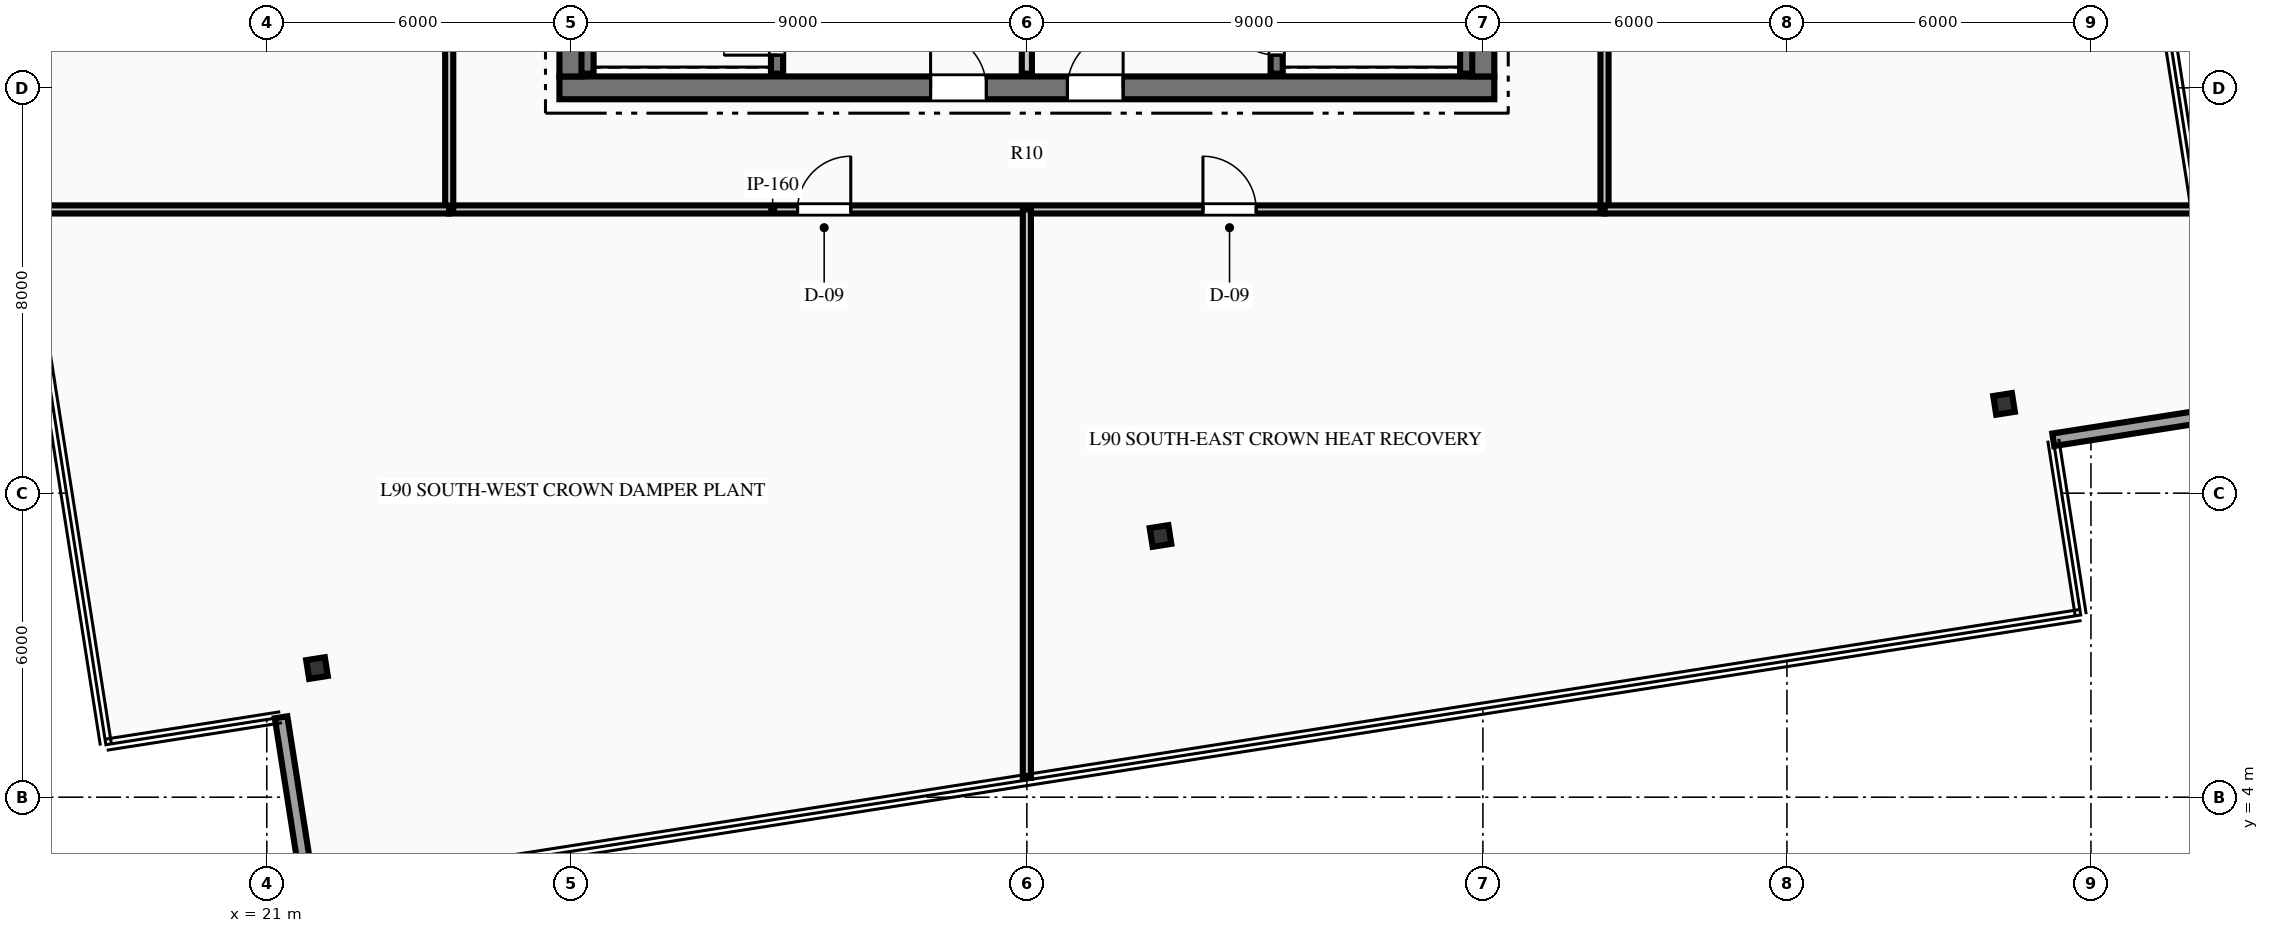
"""IFC4 building model, lengths in metres.
Left out: names, types, materials, properties, quantities, classifications, styles, units other than length and angle.
Written with IfcOpenShell. Run it as: python <this file> out.ifc"""

import sys

from ifc_helpers import new_model, si_unit, direction, frame, frame_2d, origin, origin_2d, place, context, subcontext, project, spatial, rectangle, i_section, extrude, element, fill, save


model = new_model("IFC4")
c1 = context("Model", 3, precision=1e-05, world=origin(), true_north=direction((0.0, 1.0)))
c2 = subcontext(c1, "Body", "Model", "MODEL_VIEW")
j1 = project(units=[si_unit("LENGTHUNIT", "METRE"), si_unit("PLANEANGLEUNIT", "RADIAN")], contexts=[c1])
p1 = place(None, origin())
s1 = spatial("IfcSite", under=j1, at=p1, CompositionType="ELEMENT")
p2 = place(p1, origin())
s2 = spatial("IfcBuilding", under=s1, at=p2, CompositionType="ELEMENT")
p3 = place(p2, frame((0.0, 0.0, 356.4)))
s3 = spatial("IfcBuildingStorey", under=s2, at=p3, CompositionType="ELEMENT", Elevation=356.4)
p4 = place(p3, frame((26.775, 18.0, 0.0), z_axis=(0.0, 0.0, 1.0), x_axis=(1.0, 0.0, 0.0)))
e1 = element("IfcWall", 1, at=p4, inside=s3, PredefinedType="SHEAR", context=c2, shape_type="SweptSolid", body=[
    extrude(rectangle(XDim=18.45, YDim=0.45, at=frame_2d((9.225, 0.0))), origin(), (0.0, 0.0, 1.0), 4.2),
])
p5 = place(p4, frame((7.325, 0.0, 0.0)))
e2 = element("IfcOpeningElement", 2, at=p5, cuts=e1, PredefinedType="OPENING", context=c2, shape_type="SweptSolid", body=[
    extrude(rectangle(XDim=1.1, YDim=2.15, at=frame_2d((0.55, 1.075))), frame((0.0, 0.235, 0.0), z_axis=(0.0, -1.0, 0.0), x_axis=(1.0, 0.0, 0.0)), (0.0, 0.0, 1.0), 0.47),
])
p6 = place(p4, frame((10.025, 0.0, 0.0)))
e3 = element("IfcOpeningElement", 3, at=p6, cuts=e1, PredefinedType="OPENING", context=c2, shape_type="SweptSolid", body=[
    extrude(rectangle(XDim=1.1, YDim=2.15, at=frame_2d((0.55, 1.075))), frame((0.0, 0.235, 0.0), z_axis=(0.0, -1.0, 0.0), x_axis=(1.0, 0.0, 0.0)), (0.0, 0.0, 1.0), 0.47),
])
p7 = place(p3, frame((27.0, 18.225, 0.0), z_axis=(0.0, 0.0, 1.0), x_axis=(0.0, 1.0, 0.0)))
e4 = element("IfcWall", 4, at=p7, inside=s3, PredefinedType="SHEAR", context=c2, shape_type="SweptSolid", body=[
    extrude(rectangle(XDim=15.55, YDim=0.45, at=frame_2d((7.775, 0.0))), origin(), (0.0, 0.0, 1.0), 4.2),
])
p8 = place(p7, frame((10.015, 0.0, 0.0)))
e5 = element("IfcOpeningElement", 5, at=p8, cuts=e4, PredefinedType="OPENING", context=c2, shape_type="SweptSolid", body=[
    extrude(rectangle(XDim=1.4, YDim=2.2, at=frame_2d((0.7, 1.1))), frame((0.0, 0.235, 0.0), z_axis=(0.0, -1.0, 0.0), x_axis=(1.0, 0.0, 0.0)), (0.0, 0.0, 1.0), 0.47),
])
p9 = place(p3, frame((45.0, 18.225, 0.0), z_axis=(0.0, 0.0, 1.0), x_axis=(0.0, 1.0, 0.0)))
e6 = element("IfcWall", 6, at=p9, inside=s3, PredefinedType="SHEAR", context=c2, shape_type="SweptSolid", body=[
    extrude(rectangle(XDim=15.55, YDim=0.45, at=frame_2d((7.775, 0.0))), origin(), (0.0, 0.0, 1.0), 4.2),
])
p10 = place(p9, frame((10.015, 0.0, 0.0)))
e7 = element("IfcOpeningElement", 7, at=p10, cuts=e6, PredefinedType="OPENING", context=c2, shape_type="SweptSolid", body=[
    extrude(rectangle(XDim=1.4, YDim=2.2, at=frame_2d((0.7, 1.1))), frame((0.0, 0.235, 0.0), z_axis=(0.0, -1.0, 0.0), x_axis=(1.0, 0.0, 0.0)), (0.0, 0.0, 1.0), 0.47),
])
p11 = place(p3, frame((31.07, 18.28, 0.0), z_axis=(0.0, 0.0, 1.0), x_axis=(0.0, 1.0, 0.0)))
e8 = element("IfcWall", 8, at=p11, inside=s3, PredefinedType="SHEAR", context=c2, shape_type="SweptSolid", body=[
    extrude(rectangle(XDim=8.26, YDim=0.24, at=frame_2d((4.13, 0.0))), origin(), (0.0, 0.0, 1.0), 4.2),
])
p12 = place(p11, frame((0.365, 0.0, 0.0)))
e9 = element("IfcOpeningElement", 9, at=p12, cuts=e8, PredefinedType="OPENING", context=c2, shape_type="SweptSolid", body=[
    extrude(rectangle(XDim=1.05, YDim=2.15, at=frame_2d((0.525, 1.075))), frame((0.0, 0.13, 0.0), z_axis=(0.0, -1.0, 0.0), x_axis=(1.0, 0.0, 0.0)), (0.0, 0.0, 1.0), 0.26),
])
p13 = place(p3, frame((27.33, 18.28, 0.0), z_axis=(0.0, 0.0, 1.0), x_axis=(0.0, 1.0, 0.0)))
e10 = element("IfcWall", 10, at=p13, inside=s3, PredefinedType="SHEAR", context=c2, shape_type="SweptSolid", body=[
    extrude(rectangle(XDim=8.26, YDim=0.24, at=frame_2d((4.13, 0.0))), origin(), (0.0, 0.0, 1.0), 4.2),
])
p14 = place(p3, frame((40.93, 18.28, 0.0), z_axis=(0.0, 0.0, 1.0), x_axis=(0.0, 1.0, 0.0)))
e11 = element("IfcWall", 11, at=p14, inside=s3, PredefinedType="SHEAR", context=c2, shape_type="SweptSolid", body=[
    extrude(rectangle(XDim=8.26, YDim=0.24, at=frame_2d((4.13, 0.0))), origin(), (0.0, 0.0, 1.0), 4.2),
])
p15 = place(p14, frame((0.365, 0.0, 0.0)))
e12 = element("IfcOpeningElement", 12, at=p15, cuts=e11, PredefinedType="OPENING", context=c2, shape_type="SweptSolid", body=[
    extrude(rectangle(XDim=1.05, YDim=2.15, at=frame_2d((0.525, 1.075))), frame((0.0, 0.13, 0.0), z_axis=(0.0, -1.0, 0.0), x_axis=(1.0, 0.0, 0.0)), (0.0, 0.0, 1.0), 0.26),
])
p16 = place(p3, frame((44.67, 18.28, 0.0), z_axis=(0.0, 0.0, 1.0), x_axis=(0.0, 1.0, 0.0)))
e13 = element("IfcWall", 13, at=p16, inside=s3, PredefinedType="SHEAR", context=c2, shape_type="SweptSolid", body=[
    extrude(rectangle(XDim=8.26, YDim=0.24, at=frame_2d((4.13, 0.0))), origin(), (0.0, 0.0, 1.0), 4.2),
])
for number, where, z_axis, x_axis in (
    (14, (55.285, 11.762, 0.0), (0.0, 0.0, 1.0), (-0.155, 0.988, 0.0)),
    (15, (21.991, 6.548, 0.0), (0.0, 0.0, 1.0), (-0.155, 0.988, 0.0)),
    (16, (38.638, 9.155, 0.0), (0.0, 0.0, 1.0), (-0.155, 0.988, 0.0)),
):
    element("IfcColumn", number, at=place(p3, frame(where, z_axis=z_axis, x_axis=x_axis)), inside=s3, PredefinedType="COLUMN", context=c2, shape_type="SweptSolid", body=[
        extrude(i_section(OverallWidth=0.374, OverallDepth=0.373, WebThickness=0.016, FlangeThickness=0.026, at=origin_2d()), origin(), (0.0, 0.0, 1.0), 4.2),
    ])
p17 = place(p3, frame((21.824, 2.119, 0.0), z_axis=(0.0, 0.0, 1.0), x_axis=(-0.154719468176, 0.987958443543, 0.0)))
e17 = element("IfcWall", 17, at=p17, inside=s3, PredefinedType="STANDARD", context=c2, shape_type="SweptSolid", body=[
    extrude(rectangle(XDim=3.5, YDim=0.25, at=frame_2d((1.75, 0.0))), origin(), (0.0, 0.0, 1.0), 3.93),
])
p18 = place(p3, frame((59.714, 11.595, 0.0), z_axis=(0.0, 0.0, 1.0), x_axis=(-0.987960113204, -0.154708806205, 0.0)))
e18 = element("IfcWall", 18, at=p18, inside=s3, PredefinedType="STANDARD", context=c2, shape_type="SweptSolid", body=[
    extrude(rectangle(XDim=3.5, YDim=0.25, at=frame_2d((1.75, 0.0))), origin(), (0.0, 0.0, 1.0), 3.93),
])
p19 = place(p3, frame((36.0, 18.28, 0.0), z_axis=(0.0, 0.0, 1.0), x_axis=(0.0, 1.0, 0.0)))
e19 = element("IfcWall", 19, at=p19, inside=s3, PredefinedType="PARTITIONING", context=c2, shape_type="SweptSolid", body=[
    extrude(rectangle(XDim=3.77, YDim=0.2, at=frame_2d((1.885, 0.0))), origin(), (0.0, 0.0, 1.0), 3.93),
])
p20 = place(p3, frame((24.6, 15.6, 0.0), z_axis=(0.0, 0.0, 1.0), x_axis=(1.0, 0.0, 0.0)))
e20 = element("IfcWall", 20, at=p20, inside=s3, PredefinedType="PARTITIONING", context=c2, shape_type="SweptSolid", body=[
    extrude(rectangle(XDim=22.8, YDim=0.16, at=frame_2d((11.4, 0.0))), origin(), (0.0, 0.0, 1.0), 3.93),
])
p21 = place(p20, frame((6.875, 0.0, 0.0)))
e21 = element("IfcOpeningElement", 21, at=p21, cuts=e20, PredefinedType="OPENING", context=c2, shape_type="SweptSolid", body=[
    extrude(rectangle(XDim=1.05, YDim=2.15, at=frame_2d((0.525, 1.075))), frame((0.0, 0.09, 0.0), z_axis=(0.0, -1.0, 0.0), x_axis=(1.0, 0.0, 0.0)), (0.0, 0.0, 1.0), 0.18),
])
p22 = place(p20, frame((14.875, 0.0, 0.0)))
e22 = element("IfcOpeningElement", 22, at=p22, cuts=e20, PredefinedType="OPENING", context=c2, shape_type="SweptSolid", body=[
    extrude(rectangle(XDim=1.05, YDim=2.15, at=frame_2d((0.525, 1.075))), frame((0.0, 0.09, 0.0), z_axis=(0.0, -1.0, 0.0), x_axis=(1.0, 0.0, 0.0)), (0.0, 0.0, 1.0), 0.18),
])
p23 = place(p3, frame((24.6, 15.6, 0.0), z_axis=(0.0, 0.0, 1.0), x_axis=(0.0, 1.0, 0.0)))
e23 = element("IfcWall", 23, at=p23, inside=s3, PredefinedType="PARTITIONING", context=c2, shape_type="SweptSolid", body=[
    extrude(rectangle(XDim=20.8, YDim=0.16, at=frame_2d((10.4, 0.0))), origin(), (0.0, 0.0, 1.0), 3.93),
])
p24 = place(p23, frame((7.375, 0.0, 0.0)))
e24 = element("IfcOpeningElement", 24, at=p24, cuts=e23, PredefinedType="OPENING", context=c2, shape_type="SweptSolid", body=[
    extrude(rectangle(XDim=1.05, YDim=2.15, at=frame_2d((0.525, 1.075))), frame((0.0, 0.09, 0.0), z_axis=(0.0, -1.0, 0.0), x_axis=(1.0, 0.0, 0.0)), (0.0, 0.0, 1.0), 0.18),
])
p25 = place(p3, frame((47.4, 15.6, 0.0), z_axis=(0.0, 0.0, 1.0), x_axis=(0.0, 1.0, 0.0)))
e25 = element("IfcWall", 25, at=p25, inside=s3, PredefinedType="PARTITIONING", context=c2, shape_type="SweptSolid", body=[
    extrude(rectangle(XDim=20.8, YDim=0.16, at=frame_2d((10.4, 0.0))), origin(), (0.0, 0.0, 1.0), 3.93),
])
p26 = place(p25, frame((7.375, 0.0, 0.0)))
e26 = element("IfcOpeningElement", 26, at=p26, cuts=e25, PredefinedType="OPENING", context=c2, shape_type="SweptSolid", body=[
    extrude(rectangle(XDim=1.05, YDim=2.15, at=frame_2d((0.525, 1.075))), frame((0.0, 0.09, 0.0), z_axis=(0.0, -1.0, 0.0), x_axis=(1.0, 0.0, 0.0)), (0.0, 0.0, 1.0), 0.18),
])
p27 = place(p3, frame((36.0, 4.38, 0.0), z_axis=(0.0, 0.0, 1.0), x_axis=(0.0, 1.0, 0.0)))
e27 = element("IfcWall", 27, at=p27, inside=s3, PredefinedType="PARTITIONING", context=c2, shape_type="SweptSolid", body=[
    extrude(rectangle(XDim=11.22, YDim=0.16, at=frame_2d((5.61, 0.0))), origin(), (0.0, 0.0, 1.0), 3.93),
])
p28 = place(p3, frame((16.211, 15.6, 0.0), z_axis=(0.0, 0.0, 1.0), x_axis=(1.0, 0.0, 0.0)))
e28 = element("IfcWall", 28, at=p28, inside=s3, PredefinedType="PARTITIONING", context=c2, shape_type="SweptSolid", body=[
    extrude(rectangle(XDim=8.389, YDim=0.16, at=frame_2d((4.195, 0.0))), origin(), (0.0, 0.0, 1.0), 3.93),
])
p29 = place(p3, frame((47.4, 15.6, 0.0), z_axis=(0.0, 0.0, 1.0), x_axis=(1.0, 0.0, 0.0)))
e29 = element("IfcWall", 29, at=p29, inside=s3, PredefinedType="PARTITIONING", context=c2, shape_type="SweptSolid", body=[
    extrude(rectangle(XDim=11.646, YDim=0.16, at=frame_2d((5.823, 0.0))), origin(), (0.0, 0.0, 1.0), 3.93),
])
p30 = place(p12, origin())
e30 = element("IfcDoor", 30, at=p30, inside=s3, OperationType="SINGLE_SWING_LEFT", PredefinedType="DOOR", context=c2, shape_type="SweptSolid", body=[
    extrude(rectangle(XDim=1.05, YDim=2.15, at=frame_2d((0.525, 1.075))), frame((0.0, 0.025, 0.0), z_axis=(0.0, -1.0, 0.0), x_axis=(1.0, 0.0, 0.0)), (0.0, 0.0, 1.0), 0.05),
])
fill(e9, e30)
p31 = place(p15, origin())
e31 = element("IfcDoor", 31, at=p31, inside=s3, OperationType="SINGLE_SWING_RIGHT", PredefinedType="DOOR", context=c2, shape_type="SweptSolid", body=[
    extrude(rectangle(XDim=1.05, YDim=2.15, at=frame_2d((0.525, 1.075))), frame((0.0, 0.025, 0.0), z_axis=(0.0, -1.0, 0.0), x_axis=(1.0, 0.0, 0.0)), (0.0, 0.0, 1.0), 0.05),
])
fill(e12, e31)
p32 = place(p5, origin())
e32 = element("IfcDoor", 32, at=p32, inside=s3, OperationType="SINGLE_SWING_LEFT", PredefinedType="DOOR", context=c2, shape_type="SweptSolid", body=[
    extrude(rectangle(XDim=1.1, YDim=2.15, at=frame_2d((0.55, 1.075))), frame((0.0, 0.025, 0.0), z_axis=(0.0, -1.0, 0.0), x_axis=(1.0, 0.0, 0.0)), (0.0, 0.0, 1.0), 0.05),
])
fill(e2, e32)
p33 = place(p6, origin())
e33 = element("IfcDoor", 33, at=p33, inside=s3, OperationType="SINGLE_SWING_RIGHT", PredefinedType="DOOR", context=c2, shape_type="SweptSolid", body=[
    extrude(rectangle(XDim=1.1, YDim=2.15, at=frame_2d((0.55, 1.075))), frame((0.0, 0.025, 0.0), z_axis=(0.0, -1.0, 0.0), x_axis=(1.0, 0.0, 0.0)), (0.0, 0.0, 1.0), 0.05),
])
fill(e3, e33)
p34 = place(p21, origin())
e34 = element("IfcDoor", 34, at=p34, inside=s3, OperationType="SINGLE_SWING_RIGHT", PredefinedType="DOOR", context=c2, shape_type="SweptSolid", body=[
    extrude(rectangle(XDim=1.05, YDim=2.15, at=frame_2d((0.525, 1.075))), frame((0.0, 0.025, 0.0), z_axis=(0.0, -1.0, 0.0), x_axis=(1.0, 0.0, 0.0)), (0.0, 0.0, 1.0), 0.05),
])
fill(e21, e34)
p35 = place(p22, origin())
e35 = element("IfcDoor", 35, at=p35, inside=s3, OperationType="SINGLE_SWING_LEFT", PredefinedType="DOOR", context=c2, shape_type="SweptSolid", body=[
    extrude(rectangle(XDim=1.05, YDim=2.15, at=frame_2d((0.525, 1.075))), frame((0.0, 0.025, 0.0), z_axis=(0.0, -1.0, 0.0), x_axis=(1.0, 0.0, 0.0)), (0.0, 0.0, 1.0), 0.05),
])
fill(e22, e35)
save(model, sys.argv[1])
